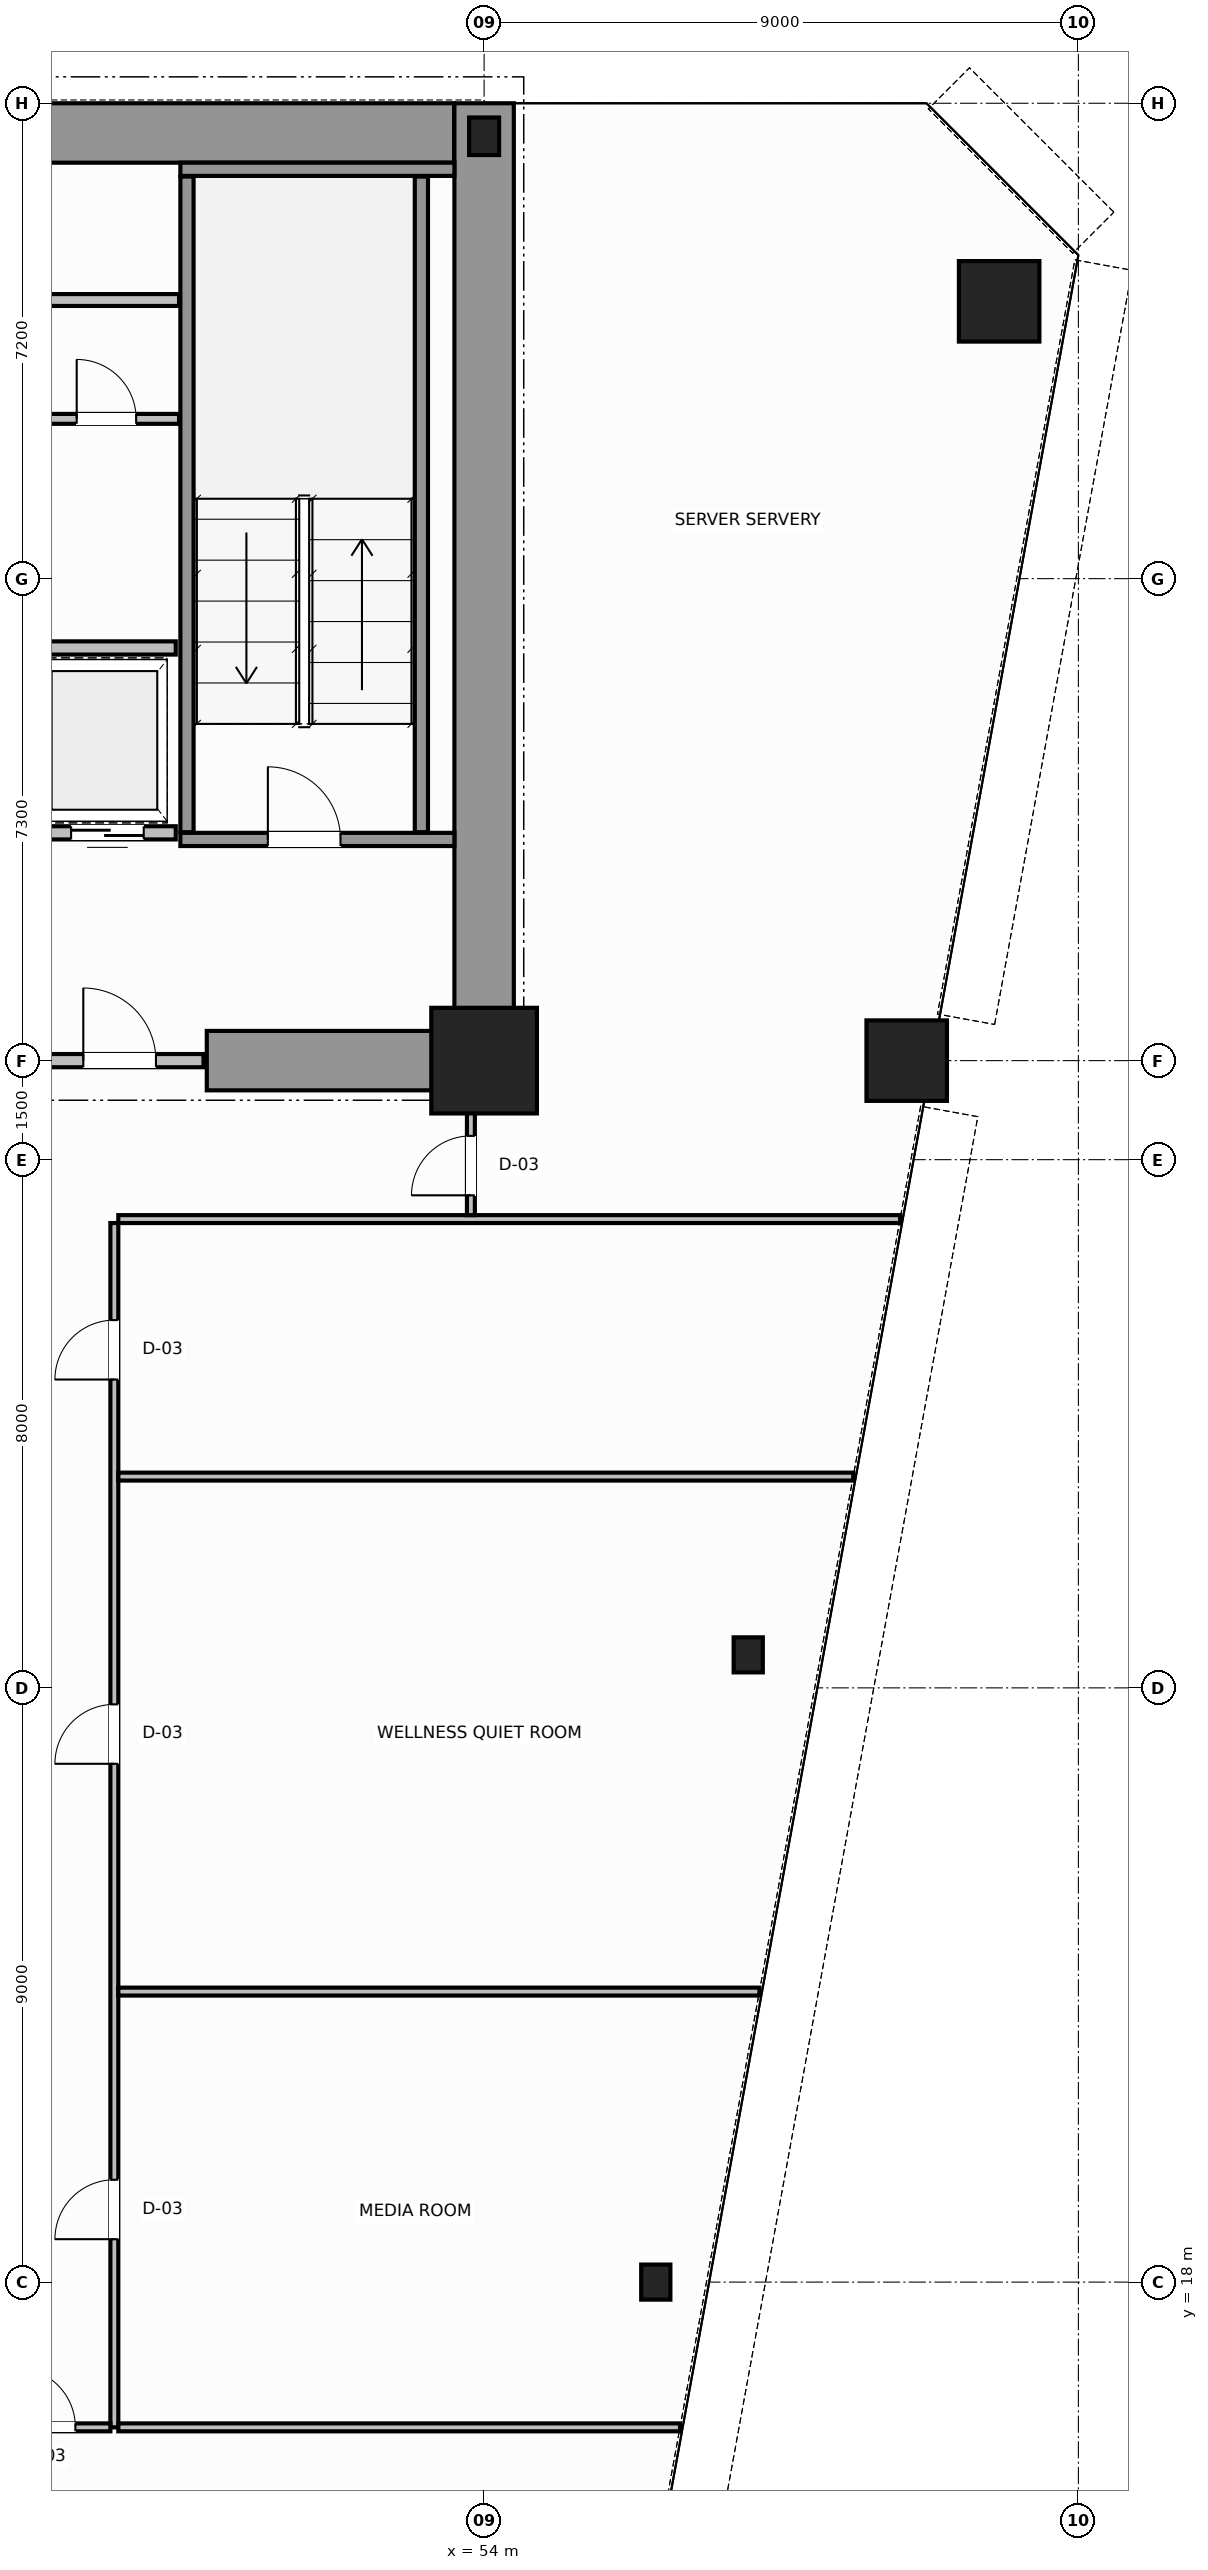
"""IFC4 building model, lengths in metres.
Left out: names, types, materials, properties, quantities, classifications, styles, units other than length and angle.
Written with IfcOpenShell. Run it as: python <this file> out.ifc"""

import sys

from ifc_helpers import new_model, si_unit, direction, frame, frame_2d, origin, origin_2d, place, context, subcontext, project, spatial, rectangle, hollow_circle, i_section, extrude, source, transform, mapped, element, fill, save


model = new_model("IFC4")
c1 = context("Model", 3, precision=1e-05, world=origin(), true_north=direction((0.0, 1.0)))
c2 = subcontext(c1, "Body", "Model", "MODEL_VIEW")
j1 = project(units=[si_unit("LENGTHUNIT", "METRE"), si_unit("PLANEANGLEUNIT", "RADIAN")], contexts=[c1])
p1 = place(None, origin())
s1 = spatial("IfcSite", under=j1, at=p1, CompositionType="ELEMENT")
p2 = place(p1, origin())
s2 = spatial("IfcBuilding", under=s1, at=p2, CompositionType="ELEMENT")
p3 = place(p2, frame((0.0, 0.0, 53.0)))
s3 = spatial("IfcBuildingStorey", under=s2, at=p3, CompositionType="ELEMENT", Elevation=53.0)
m1 = source(origin(), c2, "Body", "SweptSolid", [
    extrude(rectangle(XDim=1.6, YDim=1.6, at=origin_2d()), origin(), (0.0, 0.0, 1.0), 3.8),
])
p4 = place(p3, frame((54.0, 36.5, 0.0), z_axis=(0.0, 0.0, 1.0), x_axis=(1.0, 0.0, 0.0)))
e1 = element("IfcColumn", 1, at=p4, inside=s3, PredefinedType="COLUMN", context=c2, shape_type="MappedRepresentation", body=[
    mapped(m1, transform((0.0, 0.0, 0.0), scale=1.0)),
])
m2 = source(origin(), c2, "Body", "SweptSolid", [
    extrude(i_section(OverallWidth=0.454, OverallDepth=0.569, WebThickness=0.078, FlangeThickness=0.08, FilletRadius=0.015, at=origin_2d()), origin(), (0.0, 0.0, 1.0), 3.8),
])
p5 = place(p3, frame((54.0, 50.5, 0.0), z_axis=(0.0, 0.0, 1.0), x_axis=(1.0, 0.0, 0.0)))
e2 = element("IfcColumn", 2, at=p5, inside=s3, PredefinedType="COLUMN", context=c2, shape_type="MappedRepresentation", body=[
    mapped(m2, transform((0.0, 0.0, 0.0), scale=1.0)),
])
m3 = source(origin(), c2, "Body", "SweptSolid", [
    extrude(hollow_circle(Radius=0.61, WallThickness=0.05, at=origin_2d()), origin(), (0.0, 0.0, 1.0), 3.8),
])
for number, where, z_axis, x_axis in (
    (3, (61.8, 48.0, 0.0), (0.0, 0.0, 1.0), (1.0, 0.0, 0.0)),
    (4, (60.4, 36.5, 0.0), (0.0, 0.0, 1.0), (1.0, 0.0, 0.0)),
):
    element("IfcColumn", number, at=place(p3, frame(where, z_axis=z_axis, x_axis=x_axis)), inside=s3, PredefinedType="COLUMN", context=c2, shape_type="MappedRepresentation", body=[
        mapped(m3, transform((0.0, 0.0, 0.0), scale=1.0)),
    ])
m4 = source(origin(), c2, "Body", "SweptSolid", [
    extrude(i_section(OverallWidth=0.442, OverallDepth=0.531, WebThickness=0.065, FlangeThickness=0.076, FilletRadius=0.015, at=origin_2d()), origin(), (0.0, 0.0, 1.0), 3.8),
])
for number, where, z_axis, x_axis in (
    (5, (58.0, 27.5, 0.0), (0.0, 0.0, 1.0), (1.0, 0.0, 0.0)),
    (6, (56.6, 18.0, 0.0), (0.0, 0.0, 1.0), (1.0, 0.0, 0.0)),
):
    element("IfcColumn", number, at=place(p3, frame(where, z_axis=z_axis, x_axis=x_axis)), inside=s3, PredefinedType="COLUMN", context=c2, shape_type="MappedRepresentation", body=[
        mapped(m4, transform((0.0, 0.0, 0.0), scale=1.0)),
    ])
p6 = place(p3, frame((34.002, 50.55, 0.0), z_axis=(0.0, 0.0, 1.0), x_axis=(1.0, 0.0, 0.0)))
e7 = element("IfcWall", 7, at=p6, inside=s3, PredefinedType="SHEAR", context=c2, shape_type="SweptSolid", body=[
    extrude(rectangle(XDim=19.544, YDim=0.9, at=frame_2d((9.772, 0.0))), origin(), (0.0, 0.0, 1.0), 3.8),
])
p7 = place(p3, frame((54.0, 36.5, 0.0), z_axis=(0.0, 0.0, 1.0), x_axis=(0.0, 1.0, 0.0)))
e8 = element("IfcWall", 8, at=p7, inside=s3, PredefinedType="SHEAR", context=c2, shape_type="SweptSolid", body=[
    extrude(rectangle(XDim=14.5, YDim=0.9, at=frame_2d((7.25, 0.0))), origin(), (0.0, 0.0, 1.0), 3.8),
])
p8 = place(p3, frame((49.8, 36.5, 0.0), z_axis=(0.0, 0.0, 1.0), x_axis=(1.0, 0.0, 0.0)))
e9 = element("IfcWall", 9, at=p8, inside=s3, PredefinedType="SHEAR", context=c2, shape_type="SweptSolid", body=[
    extrude(rectangle(XDim=3.73, YDim=0.9, at=frame_2d((1.865, 0.0))), origin(), (0.0, 0.0, 1.0), 2.38),
])
p9 = place(p3, frame((49.4, 39.85, 0.0), z_axis=(0.0, 0.0, 1.0), x_axis=(1.0, 0.0, 0.0)))
e10 = element("IfcWall", 10, at=p9, inside=s3, PredefinedType="SOLIDWALL", context=c2, shape_type="SweptSolid", body=[
    extrude(rectangle(XDim=4.15, YDim=0.2, at=frame_2d((2.075, 0.0))), origin(), (0.0, 0.0, 1.0), 3.8),
])
p10 = place(p9, frame((1.325, 0.0, 0.0)))
e11 = element("IfcOpeningElement", 11, at=p10, cuts=e10, PredefinedType="OPENING", context=c2, shape_type="SweptSolid", body=[
    extrude(rectangle(XDim=1.1, YDim=2.15, at=frame_2d((0.55, 1.075))), frame((0.0, 0.11, 0.0), z_axis=(0.0, -1.0, 0.0), x_axis=(1.0, 0.0, 0.0)), (0.0, 0.0, 1.0), 0.22),
])
p11 = place(p3, frame((49.4, 50.0, 0.0), z_axis=(0.0, 0.0, 1.0), x_axis=(1.0, 0.0, 0.0)))
e12 = element("IfcWall", 12, at=p11, inside=s3, PredefinedType="SOLIDWALL", context=c2, shape_type="SweptSolid", body=[
    extrude(rectangle(XDim=4.15, YDim=0.2, at=frame_2d((2.075, 0.0))), origin(), (0.0, 0.0, 1.0), 3.8),
])
for number, where, z_axis, x_axis in (
    (13, (49.5, 39.96, 0.0), (0.0, 0.0, 1.0), (0.0, 1.0, 0.0)),
    (14, (53.05, 39.96, 0.0), (0.0, 0.0, 1.0), (0.0, 1.0, 0.0)),
):
    element("IfcWall", number, at=place(p3, frame(where, z_axis=z_axis, x_axis=x_axis)), inside=s3, PredefinedType="SOLIDWALL", context=c2, shape_type="SweptSolid", body=[
        extrude(rectangle(XDim=9.93, YDim=0.2, at=frame_2d((4.965, 0.0))), origin(), (0.0, 0.0, 1.0), 3.8),
    ])
p12 = place(p3, frame((47.28, 36.5, 0.0), z_axis=(0.0, 0.0, 1.0), x_axis=(1.0, 0.0, 0.0)))
e15 = element("IfcWall", 15, at=p12, inside=s3, PredefinedType="SOLIDWALL", context=c2, shape_type="SweptSolid", body=[
    extrude(rectangle(XDim=2.47, YDim=0.2, at=frame_2d((1.235, 0.0))), origin(), (0.0, 0.0, 1.0), 2.37),
])
p13 = place(p12, frame((0.65, 0.0, 0.0)))
e16 = element("IfcOpeningElement", 16, at=p13, cuts=e15, PredefinedType="OPENING", context=c2, shape_type="SweptSolid", body=[
    extrude(rectangle(XDim=1.1, YDim=2.15, at=frame_2d((0.55, 1.075))), frame((0.0, 0.11, 0.0), z_axis=(0.0, -1.0, 0.0), x_axis=(1.0, 0.0, 0.0)), (0.0, 0.0, 1.0), 0.22),
])
p14 = place(p3, frame((47.26, 39.95, 0.0), z_axis=(0.0, 0.0, 1.0), x_axis=(1.0, 0.0, 0.0)))
e17 = element("IfcWall", 17, at=p14, inside=s3, PredefinedType="SOLIDWALL", context=c2, shape_type="SweptSolid", body=[
    extrude(rectangle(XDim=2.07, YDim=0.2, at=frame_2d((1.035, 0.0))), origin(), (0.0, 0.0, 1.0), 3.58),
])
p15 = place(p14, frame((0.485, 0.0, 0.0)))
e18 = element("IfcOpeningElement", 18, at=p15, cuts=e17, PredefinedType="OPENING", context=c2, shape_type="SweptSolid", body=[
    extrude(rectangle(XDim=1.1, YDim=2.15, at=frame_2d((0.55, 1.075))), frame((0.0, 0.11, 0.0), z_axis=(0.0, -1.0, 0.0), x_axis=(1.0, 0.0, 0.0)), (0.0, 0.0, 1.0), 0.22),
])
p16 = place(p3, frame((47.26, 42.75, 0.0), z_axis=(0.0, 0.0, 1.0), x_axis=(1.0, 0.0, 0.0)))
e19 = element("IfcWall", 19, at=p16, inside=s3, PredefinedType="SOLIDWALL", context=c2, shape_type="SweptSolid", body=[
    extrude(rectangle(XDim=2.07, YDim=0.2, at=frame_2d((1.035, 0.0))), origin(), (0.0, 0.0, 1.0), 3.58),
])
p17 = place(p3, frame((47.28, 46.22, 0.0), z_axis=(0.0, 0.0, 1.0), x_axis=(1.0, 0.0, 0.0)))
e20 = element("IfcWall", 20, at=p17, inside=s3, PredefinedType="PARTITIONING", context=c2, shape_type="SweptSolid", body=[
    extrude(rectangle(XDim=2.1, YDim=0.15, at=frame_2d((1.05, 0.0))), origin(), (0.0, 0.0, 1.0), 3.58),
])
p18 = place(p17, frame((0.55, 0.0, 0.0)))
e21 = element("IfcOpeningElement", 21, at=p18, cuts=e20, PredefinedType="OPENING", context=c2, shape_type="SweptSolid", body=[
    extrude(rectangle(XDim=0.9, YDim=2.1, at=frame_2d((0.45, 1.05))), frame((0.0, 0.085, 0.0), z_axis=(0.0, -1.0, 0.0), x_axis=(1.0, 0.0, 0.0)), (0.0, 0.0, 1.0), 0.17),
])
p19 = place(p3, frame((18.62, 48.02, 0.0), z_axis=(0.0, 0.0, 1.0), x_axis=(1.0, 0.0, 0.0)))
e22 = element("IfcWall", 22, at=p19, inside=s3, PredefinedType="PLUMBINGWALL", context=c2, shape_type="SweptSolid", body=[
    extrude(rectangle(XDim=30.76, YDim=0.18, at=frame_2d((15.38, 0.0))), origin(), (0.0, 0.0, 1.0), 3.58),
])
p20 = place(p19, frame((1.955, 0.0, 0.0)))
e23 = element("IfcOpeningElement", 23, at=p20, cuts=e22, PredefinedType="OPENING", context=c2, shape_type="SweptSolid", body=[
    extrude(rectangle(XDim=0.9, YDim=2.15, at=frame_2d((0.45, 1.075))), frame((0.0, 0.1, 0.0), z_axis=(0.0, -1.0, 0.0), x_axis=(1.0, 0.0, 0.0)), (0.0, 0.0, 1.0), 0.2),
])
p21 = place(p19, frame((8.03, 0.0, 0.0)))
e24 = element("IfcOpeningElement", 24, at=p21, cuts=e22, PredefinedType="OPENING", context=c2, shape_type="SweptSolid", body=[
    extrude(rectangle(XDim=0.9, YDim=2.15, at=frame_2d((0.45, 1.075))), frame((0.0, 0.1, 0.0), z_axis=(0.0, -1.0, 0.0), x_axis=(1.0, 0.0, 0.0)), (0.0, 0.0, 1.0), 0.2),
])
p22 = place(p19, frame((16.93, 0.0, 0.0)))
e25 = element("IfcOpeningElement", 25, at=p22, cuts=e22, PredefinedType="OPENING", context=c2, shape_type="SweptSolid", body=[
    extrude(rectangle(XDim=0.9, YDim=2.15, at=frame_2d((0.45, 1.075))), frame((0.0, 0.1, 0.0), z_axis=(0.0, -1.0, 0.0), x_axis=(1.0, 0.0, 0.0)), (0.0, 0.0, 1.0), 0.2),
])
p23 = place(p19, frame((26.205, 0.0, 0.0)))
e26 = element("IfcOpeningElement", 26, at=p23, cuts=e22, PredefinedType="OPENING", context=c2, shape_type="SweptSolid", body=[
    extrude(rectangle(XDim=0.9, YDim=2.15, at=frame_2d((0.45, 1.075))), frame((0.0, 0.1, 0.0), z_axis=(0.0, -1.0, 0.0), x_axis=(1.0, 0.0, 0.0)), (0.0, 0.0, 1.0), 0.2),
])
p24 = place(p3, frame((48.46, 34.1, 0.0), z_axis=(0.0, 0.0, 1.0), x_axis=(1.0, 0.0, 0.0)))
e27 = element("IfcWall", 27, at=p24, inside=s3, PredefinedType="PARTITIONING", context=c2, shape_type="SweptSolid", body=[
    extrude(rectangle(XDim=11.841, YDim=0.12, at=frame_2d((5.92, 0.0))), origin(), (0.0, 0.0, 1.0), 3.58),
])
p25 = place(p3, frame((53.8, 34.16, 0.0), z_axis=(0.0, 0.0, 1.0), x_axis=(0.0, 1.0, 0.0)))
e28 = element("IfcWall", 28, at=p25, inside=s3, PredefinedType="PARTITIONING", context=c2, shape_type="SweptSolid", body=[
    extrude(rectangle(XDim=2.28, YDim=0.12, at=frame_2d((1.14, 0.0))), origin(), (0.0, 0.0, 1.0), 3.58),
])
p26 = place(p25, frame((0.3, 0.0, 0.0)))
e29 = element("IfcOpeningElement", 29, at=p26, cuts=e28, PredefinedType="OPENING", context=c2, shape_type="SweptSolid", body=[
    extrude(rectangle(XDim=0.9, YDim=2.15, at=frame_2d((0.45, 1.075))), frame((0.0, 0.07, 0.0), z_axis=(0.0, -1.0, 0.0), x_axis=(1.0, 0.0, 0.0)), (0.0, 0.0, 1.0), 0.14),
])
p27 = place(p3, frame((48.4, 15.8, 0.0), z_axis=(0.0, 0.0, 1.0), x_axis=(0.0, 1.0, 0.0)))
e30 = element("IfcWall", 30, at=p27, inside=s3, PredefinedType="PARTITIONING", context=c2, shape_type="SweptSolid", body=[
    extrude(rectangle(XDim=18.24, YDim=0.12, at=frame_2d((9.12, 0.0))), origin(), (0.0, 0.0, 1.0), 3.58),
])
p28 = place(p27, frame((2.85, 0.0, 0.0)))
e31 = element("IfcOpeningElement", 31, at=p28, cuts=e30, PredefinedType="OPENING", context=c2, shape_type="SweptSolid", body=[
    extrude(rectangle(XDim=0.9, YDim=2.15, at=frame_2d((0.45, 1.075))), frame((0.0, 0.07, 0.0), z_axis=(0.0, -1.0, 0.0), x_axis=(1.0, 0.0, 0.0)), (0.0, 0.0, 1.0), 0.14),
])
p29 = place(p27, frame((10.05, 0.0, 0.0)))
e32 = element("IfcOpeningElement", 32, at=p29, cuts=e30, PredefinedType="OPENING", context=c2, shape_type="SweptSolid", body=[
    extrude(rectangle(XDim=0.9, YDim=2.15, at=frame_2d((0.45, 1.075))), frame((0.0, 0.07, 0.0), z_axis=(0.0, -1.0, 0.0), x_axis=(1.0, 0.0, 0.0)), (0.0, 0.0, 1.0), 0.14),
])
p30 = place(p27, frame((15.87, 0.0, 0.0)))
e33 = element("IfcOpeningElement", 33, at=p30, cuts=e30, PredefinedType="OPENING", context=c2, shape_type="SweptSolid", body=[
    extrude(rectangle(XDim=0.9, YDim=2.15, at=frame_2d((0.45, 1.075))), frame((0.0, 0.07, 0.0), z_axis=(0.0, -1.0, 0.0), x_axis=(1.0, 0.0, 0.0)), (0.0, 0.0, 1.0), 0.14),
])
p31 = place(p3, frame((46.46, 15.8, 0.0), z_axis=(0.0, 0.0, 1.0), x_axis=(1.0, 0.0, 0.0)))
e34 = element("IfcWall", 34, at=p31, inside=s3, PredefinedType="PARTITIONING", context=c2, shape_type="SweptSolid", body=[
    extrude(rectangle(XDim=1.88, YDim=0.12, at=frame_2d((0.94, 0.0))), origin(), (0.0, 0.0, 1.0), 3.58),
])
p32 = place(p31, frame((0.45, 0.0, 0.0)))
e35 = element("IfcOpeningElement", 35, at=p32, cuts=e34, PredefinedType="OPENING", context=c2, shape_type="SweptSolid", body=[
    extrude(rectangle(XDim=0.9, YDim=2.15, at=frame_2d((0.45, 1.075))), frame((0.0, 0.07, 0.0), z_axis=(0.0, -1.0, 0.0), x_axis=(1.0, 0.0, 0.0)), (0.0, 0.0, 1.0), 0.14),
])
p33 = place(p3, frame((48.46, 15.8, 0.0), z_axis=(0.0, 0.0, 1.0), x_axis=(1.0, 0.0, 0.0)))
e36 = element("IfcWall", 36, at=p33, inside=s3, PredefinedType="PARTITIONING", context=c2, shape_type="SweptSolid", body=[
    extrude(rectangle(XDim=8.507, YDim=0.12, at=frame_2d((4.253, 0.0))), origin(), (0.0, 0.0, 1.0), 3.58),
])
p34 = place(p3, frame((48.46, 22.4, 0.0), z_axis=(0.0, 0.0, 1.0), x_axis=(1.0, 0.0, 0.0)))
e37 = element("IfcWall", 37, at=p34, inside=s3, PredefinedType="PARTITIONING", context=c2, shape_type="SweptSolid", body=[
    extrude(rectangle(XDim=9.709, YDim=0.12, at=frame_2d((4.855, 0.0))), origin(), (0.0, 0.0, 1.0), 3.58),
])
p35 = place(p3, frame((48.46, 30.2, 0.0), z_axis=(0.0, 0.0, 1.0), x_axis=(1.0, 0.0, 0.0)))
e38 = element("IfcWall", 38, at=p35, inside=s3, PredefinedType="PARTITIONING", context=c2, shape_type="SweptSolid", body=[
    extrude(rectangle(XDim=11.13, YDim=0.12, at=frame_2d((5.565, 0.0))), origin(), (0.0, 0.0, 1.0), 3.02),
])
m5 = source(origin(), c2, "Body", "SweptSolid", [
    extrude(rectangle(XDim=1.1, YDim=2.15, at=frame_2d((0.55, 1.075))), frame((0.0, 0.025, 0.0), z_axis=(0.0, -1.0, 0.0), x_axis=(1.0, 0.0, 0.0)), (0.0, 0.0, 1.0), 0.05),
])
p36 = place(p10, origin())
e39 = element("IfcDoor", 39, at=p36, inside=s3, OperationType="SINGLE_SWING_RIGHT", PredefinedType="DOOR", context=c2, shape_type="MappedRepresentation", body=[
    mapped(m5, transform((0.0, 0.0, 0.0), scale=1.0)),
])
fill(e11, e39)
p37 = place(p13, origin())
e40 = element("IfcDoor", 40, at=p37, inside=s3, OperationType="SINGLE_SWING_LEFT", PredefinedType="DOOR", context=c2, shape_type="MappedRepresentation", body=[
    mapped(m5, transform((0.0, 0.0, 0.0), scale=1.0)),
])
fill(e16, e40)
p38 = place(p15, origin())
e41 = element("IfcDoor", 41, at=p38, inside=s3, OperationType="DOUBLE_DOOR_SLIDING", PredefinedType="DOOR", context=c2, shape_type="MappedRepresentation", body=[
    mapped(m5, transform((0.0, 0.0, 0.0), scale=1.0)),
])
fill(e18, e41)
m6 = source(origin(), c2, "Body", "SweptSolid", [
    extrude(rectangle(XDim=0.9, YDim=2.1, at=frame_2d((0.45, 1.05))), frame((0.0, 0.025, 0.0), z_axis=(0.0, -1.0, 0.0), x_axis=(1.0, 0.0, 0.0)), (0.0, 0.0, 1.0), 0.05),
])
p39 = place(p18, origin())
e42 = element("IfcDoor", 42, at=p39, inside=s3, OperationType="SINGLE_SWING_RIGHT", PredefinedType="DOOR", context=c2, shape_type="MappedRepresentation", body=[
    mapped(m6, transform((0.0, 0.0, 0.0), scale=1.0)),
])
fill(e21, e42)
m7 = source(origin(), c2, "Body", "SweptSolid", [
    extrude(rectangle(XDim=0.9, YDim=2.15, at=frame_2d((0.45, 1.075))), frame((0.0, 0.025, 0.0), z_axis=(0.0, -1.0, 0.0), x_axis=(1.0, 0.0, 0.0)), (0.0, 0.0, 1.0), 0.05),
])
p40 = place(p26, origin())
e43 = element("IfcDoor", 43, at=p40, inside=s3, OperationType="SINGLE_SWING_RIGHT", PredefinedType="DOOR", context=c2, shape_type="MappedRepresentation", body=[
    mapped(m7, transform((0.0, 0.0, 0.0), scale=1.0)),
])
fill(e29, e43)
p41 = place(p28, origin())
e44 = element("IfcDoor", 44, at=p41, inside=s3, OperationType="SINGLE_SWING_RIGHT", PredefinedType="DOOR", context=c2, shape_type="MappedRepresentation", body=[
    mapped(m7, transform((0.0, 0.0, 0.0), scale=1.0)),
])
fill(e31, e44)
p42 = place(p29, origin())
e45 = element("IfcDoor", 45, at=p42, inside=s3, OperationType="SINGLE_SWING_LEFT", PredefinedType="DOOR", context=c2, shape_type="MappedRepresentation", body=[
    mapped(m7, transform((0.0, 0.0, 0.0), scale=1.0)),
])
fill(e32, e45)
p43 = place(p30, origin())
e46 = element("IfcDoor", 46, at=p43, inside=s3, OperationType="SINGLE_SWING_RIGHT", PredefinedType="DOOR", context=c2, shape_type="MappedRepresentation", body=[
    mapped(m7, transform((0.0, 0.0, 0.0), scale=1.0)),
])
fill(e33, e46)
p44 = place(p32, origin())
e47 = element("IfcDoor", 47, at=p44, inside=s3, OperationType="SINGLE_SWING_RIGHT", PredefinedType="DOOR", context=c2, shape_type="MappedRepresentation", body=[
    mapped(m7, transform((0.0, 0.0, 0.0), scale=1.0)),
])
fill(e35, e47)
save(model, sys.argv[1])
